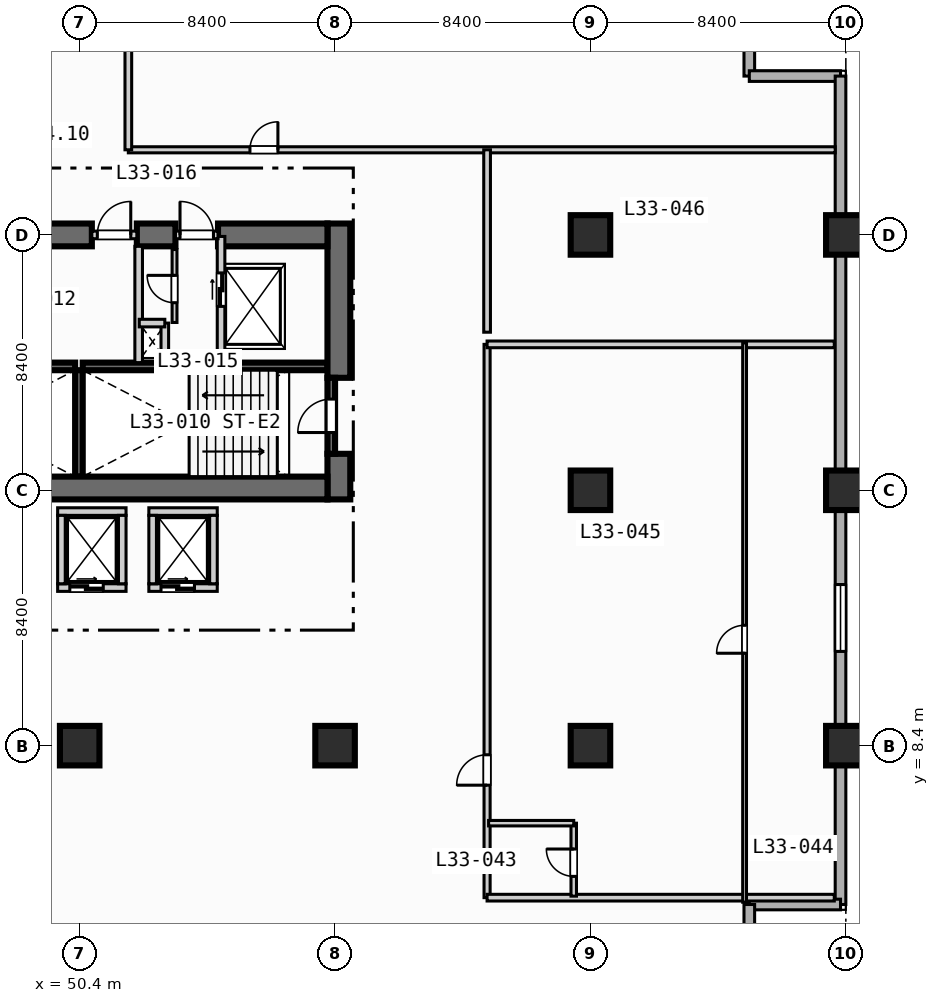
"""IFC4 building model, lengths in metres.
Left out: names, types, materials, properties, quantities, classifications, styles, units other than length and angle.
Written with IfcOpenShell. Run it as: python <this file> out.ifc"""

import sys

from ifc_helpers import new_model, si_unit, direction, frame, frame_2d, origin, origin_2d, place, context, subcontext, project, spatial, rectangle, extrude, element, fill, save


model = new_model("IFC4")
c1 = context("Model", 3, precision=1e-05, world=origin(), true_north=direction((0.0, 1.0)))
c2 = subcontext(c1, "Body", "Model", "MODEL_VIEW")
j1 = project(units=[si_unit("LENGTHUNIT", "METRE"), si_unit("PLANEANGLEUNIT", "RADIAN")], contexts=[c1])
p1 = place(None, origin())
s1 = spatial("IfcSite", under=j1, at=p1, CompositionType="ELEMENT")
p2 = place(p1, origin())
s2 = spatial("IfcBuilding", under=s1, at=p2, CompositionType="ELEMENT")
p3 = place(p2, frame((0.0, 0.0, 138.0)))
s3 = spatial("IfcBuildingStorey", under=s2, at=p3, CompositionType="ELEMENT", Elevation=138.0)
for number, where, z_axis, x_axis in (
    (1, (42.2, 20.875, 0.0), (0.0, 0.0, 1.0), (1.0, 0.0, 0.0)),
    (2, (50.5, 20.875, 0.0), (0.0, 0.0, 1.0), (1.0, 0.0, 0.0)),
):
    element("IfcWall", number, at=place(p3, frame(where, z_axis=z_axis, x_axis=x_axis)), inside=s3, PredefinedType="SOLIDWALL", context=c2, shape_type="SweptSolid", body=[
        extrude(rectangle(XDim=8.05, YDim=0.25, at=frame_2d((4.025, 0.0))), origin(), (0.0, 0.0, 1.0), 3.55),
    ])
p4 = place(p3, frame((50.375, 17.25, 0.0), z_axis=(0.0, 0.0, 1.0), x_axis=(0.0, 1.0, 0.0)))
e3 = element("IfcWall", 3, at=p4, inside=s3, PredefinedType="SOLIDWALL", context=c2, shape_type="SweptSolid", body=[
    extrude(rectangle(XDim=3.5, YDim=0.25, at=frame_2d((1.75, 0.0))), origin(), (0.0, 0.0, 1.0), 3.55),
])
p5 = place(p3, frame((58.925, 16.5, 0.0), z_axis=(0.0, 0.0, 1.0), x_axis=(0.0, 1.0, 0.0)))
e4 = element("IfcWall", 4, at=p5, inside=s3, PredefinedType="SHEAR", context=c2, shape_type="SweptSolid", body=[
    extrude(rectangle(XDim=1.5, YDim=0.75, at=frame_2d((0.75, 0.0))), origin(), (0.0, 0.0, 1.0), 3.55),
])
p6 = place(p3, frame((58.925, 20.5, 0.0), z_axis=(0.0, 0.0, 1.0), x_axis=(0.0, 1.0, 0.0)))
e5 = element("IfcWall", 5, at=p6, inside=s3, PredefinedType="SHEAR", context=c2, shape_type="SweptSolid", body=[
    extrude(rectangle(XDim=5.075, YDim=0.75, at=frame_2d((2.538, 0.0))), origin(), (0.0, 0.0, 1.0), 3.55),
])
p7 = place(p3, frame((42.2, 16.875, 0.0), z_axis=(0.0, 0.0, 1.0), x_axis=(1.0, 0.0, 0.0)))
e6 = element("IfcWall", 6, at=p7, inside=s3, PredefinedType="SHEAR", context=c2, shape_type="SweptSolid", body=[
    extrude(rectangle(XDim=16.35, YDim=0.75, at=frame_2d((8.175, 0.0))), origin(), (0.0, 0.0, 1.0), 3.55),
])
p8 = place(p3, frame((42.2, 25.2, 0.0), z_axis=(0.0, 0.0, 1.0), x_axis=(1.0, 0.0, 0.0)))
e7 = element("IfcWall", 7, at=p8, inside=s3, PredefinedType="SHEAR", context=c2, shape_type="SweptSolid", body=[
    extrude(rectangle(XDim=8.6, YDim=0.75, at=frame_2d((4.3, 0.0))), origin(), (0.0, 0.0, 1.0), 3.55),
])
p9 = place(p3, frame((52.28, 25.2, 0.0), z_axis=(0.0, 0.0, 1.0), x_axis=(1.0, 0.0, 0.0)))
e8 = element("IfcWall", 8, at=p9, inside=s3, PredefinedType="SHEAR", context=c2, shape_type="SweptSolid", body=[
    extrude(rectangle(XDim=1.27, YDim=0.75, at=frame_2d((0.635, 0.0))), origin(), (0.0, 0.0, 1.0), 3.55),
])
p10 = place(p3, frame((54.95, 25.2, 0.0), z_axis=(0.0, 0.0, 1.0), x_axis=(1.0, 0.0, 0.0)))
e9 = element("IfcWall", 9, at=p10, inside=s3, PredefinedType="SHEAR", context=c2, shape_type="SweptSolid", body=[
    extrude(rectangle(XDim=3.6, YDim=0.75, at=frame_2d((1.8, 0.0))), origin(), (0.0, 0.0, 1.0), 3.55),
])
for number, where, z_axis, x_axis in (
    (10, (50.4, 8.4, 0.0), (0.0, 0.0, 1.0), (1.0, 0.0, 0.0)),
    (11, (58.8, 8.4, 0.0), (0.0, 0.0, 1.0), (1.0, 0.0, 0.0)),
    (12, (67.2, 8.4, 0.0), (0.0, 0.0, 1.0), (1.0, 0.0, 0.0)),
    (13, (67.2, 16.8, 0.0), (0.0, 0.0, 1.0), (1.0, 0.0, 0.0)),
    (14, (67.2, 25.2, 0.0), (0.0, 0.0, 1.0), (1.0, 0.0, 0.0)),
    (15, (75.6, 8.4, 0.0), (0.0, 0.0, 1.0), (1.0, 0.0, 0.0)),
    (16, (75.6, 16.8, 0.0), (0.0, 0.0, 1.0), (1.0, 0.0, 0.0)),
    (17, (75.6, 25.2, 0.0), (0.0, 0.0, 1.0), (1.0, 0.0, 0.0)),
):
    element("IfcColumn", number, at=place(p3, frame(where, z_axis=z_axis, x_axis=x_axis)), inside=s3, PredefinedType="COLUMN", context=c2, shape_type="SweptSolid", body=[
        extrude(rectangle(XDim=1.3, YDim=1.3, at=origin_2d()), origin(), (0.0, 0.0, 1.0), 3.8),
    ])
for number, where, z_axis, x_axis in (
    (18, (72.425, 33.425, 0.0), (0.0, 0.0, 1.0), (0.0, -1.0, 0.0)),
    (19, (72.425, 30.425, 0.0), (0.0, 0.0, 1.0), (1.0, 0.0, 0.0)),
):
    element("IfcWall", number, at=place(p3, frame(where, z_axis=z_axis, x_axis=x_axis)), inside=s3, PredefinedType="STANDARD", context=c2, shape_type="SweptSolid", body=[
        extrude(rectangle(XDim=3.0, YDim=0.35, at=frame_2d((1.5, 0.0))), origin(), (0.0, 0.0, 1.0), 3.55),
    ])
p11 = place(p3, frame((75.425, 30.425, 0.0), z_axis=(0.0, 0.0, 1.0), x_axis=(0.0, -1.0, 0.0)))
e20 = element("IfcWall", 20, at=p11, inside=s3, PredefinedType="STANDARD", context=c2, shape_type="SweptSolid", body=[
    extrude(rectangle(XDim=27.25, YDim=0.35, at=frame_2d((13.625, 0.0))), origin(), (0.0, 0.0, 1.0), 3.55),
])
p12 = place(p11, frame((16.725, 0.0, 0.85)))
e21 = element("IfcOpeningElement", 21, at=p12, cuts=e20, PredefinedType="OPENING", context=c2, shape_type="SweptSolid", body=[
    extrude(rectangle(XDim=2.2, YDim=1.8, at=frame_2d((1.1, 0.9))), frame((0.0, 0.185, 0.0), z_axis=(0.0, -1.0, 0.0), x_axis=(1.0, 0.0, 0.0)), (0.0, 0.0, 1.0), 0.37),
])
for number, where, z_axis, x_axis in (
    (22, (75.425, 3.175, 0.0), (0.0, 0.0, 1.0), (-1.0, 0.0, 0.0)),
    (23, (72.425, 3.175, 0.0), (0.0, 0.0, 1.0), (0.0, -1.0, 0.0)),
):
    element("IfcWall", number, at=place(p3, frame(where, z_axis=z_axis, x_axis=x_axis)), inside=s3, PredefinedType="STANDARD", context=c2, shape_type="SweptSolid", body=[
        extrude(rectangle(XDim=3.0, YDim=0.35, at=frame_2d((1.5, 0.0))), origin(), (0.0, 0.0, 1.0), 3.55),
    ])
p13 = place(p3, frame((58.675, 18.0, 0.0), z_axis=(0.0, 0.0, 1.0), x_axis=(0.0, 1.0, 0.0)))
e24 = element("IfcWall", 24, at=p13, inside=s3, PredefinedType="SOLIDWALL", context=c2, shape_type="SweptSolid", body=[
    extrude(rectangle(XDim=2.5, YDim=0.25, at=frame_2d((1.25, 0.0))), origin(), (0.0, 0.0, 1.0), 3.55),
])
p14 = place(p13, frame((0.7, 0.0, 0.0)))
e25 = element("IfcOpeningElement", 25, at=p14, cuts=e24, PredefinedType="OPENING", context=c2, shape_type="SweptSolid", body=[
    extrude(rectangle(XDim=1.1, YDim=2.15, at=frame_2d((0.55, 1.075))), frame((0.0, 0.135, 0.0), z_axis=(0.0, -1.0, 0.0), x_axis=(1.0, 0.0, 0.0)), (0.0, 0.0, 1.0), 0.27),
])
p15 = place(p3, frame((50.8, 25.2, 0.0), z_axis=(0.0, 0.0, 1.0), x_axis=(1.0, 0.0, 0.0)))
e26 = element("IfcWall", 26, at=p15, inside=s3, PredefinedType="SOLIDWALL", context=c2, shape_type="SweptSolid", body=[
    extrude(rectangle(XDim=1.48, YDim=0.25, at=frame_2d((0.74, 0.0))), origin(), (0.0, 0.0, 1.0), 3.55),
])
p16 = place(p15, frame((0.18, 0.0, 0.0)))
e27 = element("IfcOpeningElement", 27, at=p16, cuts=e26, PredefinedType="OPENING", context=c2, shape_type="SweptSolid", body=[
    extrude(rectangle(XDim=1.1, YDim=2.15, at=frame_2d((0.55, 1.075))), frame((0.0, 0.135, 0.0), z_axis=(0.0, -1.0, 0.0), x_axis=(1.0, 0.0, 0.0)), (0.0, 0.0, 1.0), 0.27),
])
p17 = place(p3, frame((52.34, 21.0, 0.0), z_axis=(0.0, 0.0, 1.0), x_axis=(0.0, 1.0, 0.0)))
e28 = element("IfcWall", 28, at=p17, inside=s3, PredefinedType="SOLIDWALL", context=c2, shape_type="SweptSolid", body=[
    extrude(rectangle(XDim=3.825, YDim=0.25, at=frame_2d((1.913, 0.0))), origin(), (0.0, 0.0, 1.0), 3.55),
])
p18 = place(p3, frame((55.05, 21.0, 0.0), z_axis=(0.0, 0.0, 1.0), x_axis=(0.0, 1.0, 0.0)))
e29 = element("IfcWall", 29, at=p18, inside=s3, PredefinedType="SOLIDWALL", context=c2, shape_type="SweptSolid", body=[
    extrude(rectangle(XDim=4.15, YDim=0.25, at=frame_2d((2.075, 0.0))), origin(), (0.0, 0.0, 1.0), 3.55),
])
p19 = place(p18, frame((1.85, 0.0, 0.0)))
e30 = element("IfcOpeningElement", 30, at=p19, cuts=e29, PredefinedType="OPENING", context=c2, shape_type="SweptSolid", body=[
    extrude(rectangle(XDim=1.1, YDim=2.15, at=frame_2d((0.55, 1.075))), frame((0.0, 0.135, 0.0), z_axis=(0.0, -1.0, 0.0), x_axis=(1.0, 0.0, 0.0)), (0.0, 0.0, 1.0), 0.27),
])
p20 = place(p3, frame((53.55, 25.2, 0.0), z_axis=(0.0, 0.0, 1.0), x_axis=(1.0, 0.0, 0.0)))
e31 = element("IfcWall", 31, at=p20, inside=s3, PredefinedType="SOLIDWALL", context=c2, shape_type="SweptSolid", body=[
    extrude(rectangle(XDim=1.4, YDim=0.25, at=frame_2d((0.7, 0.0))), origin(), (0.0, 0.0, 1.0), 3.55),
])
p21 = place(p20, frame((0.15, 0.0, 0.0)))
e32 = element("IfcOpeningElement", 32, at=p21, cuts=e31, PredefinedType="OPENING", context=c2, shape_type="SweptSolid", body=[
    extrude(rectangle(XDim=1.1, YDim=2.15, at=frame_2d((0.55, 1.075))), frame((0.0, 0.135, 0.0), z_axis=(0.0, -1.0, 0.0), x_axis=(1.0, 0.0, 0.0)), (0.0, 0.0, 1.0), 0.27),
])
p22 = place(p3, frame((53.2, 21.0, 0.0), z_axis=(0.0, 0.0, 1.0), x_axis=(0.0, 1.0, 0.0)))
e33 = element("IfcWall", 33, at=p22, inside=s3, PredefinedType="SOLIDWALL", context=c2, shape_type="SweptSolid", body=[
    extrude(rectangle(XDim=1.3, YDim=0.25, at=frame_2d((0.65, 0.0))), origin(), (0.0, 0.0, 1.0), 3.55),
])
p23 = place(p3, frame((52.36, 22.3, 0.0), z_axis=(0.0, 0.0, 1.0), x_axis=(1.0, 0.0, 0.0)))
e34 = element("IfcWall", 34, at=p23, inside=s3, PredefinedType="SOLIDWALL", context=c2, shape_type="SweptSolid", body=[
    extrude(rectangle(XDim=0.84, YDim=0.25, at=frame_2d((0.42, 0.0))), origin(), (0.0, 0.0, 1.0), 3.55),
])
p24 = place(p3, frame((53.52, 22.32, 0.0), z_axis=(0.0, 0.0, 1.0), x_axis=(0.0, 1.0, 0.0)))
e35 = element("IfcWall", 35, at=p24, inside=s3, PredefinedType="PARTITIONING", context=c2, shape_type="SweptSolid", body=[
    extrude(rectangle(XDim=2.4, YDim=0.16, at=frame_2d((1.2, 0.0))), origin(), (0.0, 0.0, 1.0), 3.55),
])
p25 = place(p24, frame((0.65, 0.0, 0.0)))
e36 = element("IfcOpeningElement", 36, at=p25, cuts=e35, PredefinedType="OPENING", context=c2, shape_type="SweptSolid", body=[
    extrude(rectangle(XDim=0.9, YDim=2.1, at=frame_2d((0.45, 1.05))), frame((0.0, 0.09, 0.0), z_axis=(0.0, -1.0, 0.0), x_axis=(1.0, 0.0, 0.0)), (0.0, 0.0, 1.0), 0.18),
])
p26 = place(p3, frame((49.675, 13.6, 0.0), z_axis=(0.0, 0.0, 1.0), x_axis=(1.0, 0.0, 0.0)))
e37 = element("IfcWall", 37, at=p26, inside=s3, PredefinedType="SOLIDWALL", context=c2, shape_type="SweptSolid", body=[
    extrude(rectangle(XDim=2.25, YDim=0.25, at=frame_2d((1.125, 0.0))), origin(), (0.0, 0.0, 1.0), 3.55),
])
p27 = place(p26, frame((0.4, 0.0, 0.0)))
e38 = element("IfcOpeningElement", 38, at=p27, cuts=e37, PredefinedType="OPENING", context=c2, shape_type="SweptSolid", body=[
    extrude(rectangle(XDim=1.1, YDim=2.15, at=frame_2d((0.55, 1.075))), frame((0.0, 0.135, 0.0), z_axis=(0.0, -1.0, 0.0), x_axis=(1.0, 0.0, 0.0)), (0.0, 0.0, 1.0), 0.27),
])
for number, where, z_axis, x_axis in (
    (39, (49.675, 16.1, 0.0), (0.0, 0.0, 1.0), (1.0, 0.0, 0.0)),
    (40, (49.8, 13.725, 0.0), (0.0, 0.0, 1.0), (0.0, 1.0, 0.0)),
    (41, (51.8, 13.725, 0.0), (0.0, 0.0, 1.0), (0.0, 1.0, 0.0)),
):
    element("IfcWall", number, at=place(p3, frame(where, z_axis=z_axis, x_axis=x_axis)), inside=s3, PredefinedType="SOLIDWALL", context=c2, shape_type="SweptSolid", body=[
        extrude(rectangle(XDim=2.25, YDim=0.25, at=frame_2d((1.125, 0.0))), origin(), (0.0, 0.0, 1.0), 3.55),
    ])
p28 = place(p3, frame((52.675, 13.6, 0.0), z_axis=(0.0, 0.0, 1.0), x_axis=(1.0, 0.0, 0.0)))
e42 = element("IfcWall", 42, at=p28, inside=s3, PredefinedType="SOLIDWALL", context=c2, shape_type="SweptSolid", body=[
    extrude(rectangle(XDim=2.25, YDim=0.25, at=frame_2d((1.125, 0.0))), origin(), (0.0, 0.0, 1.0), 3.55),
])
p29 = place(p28, frame((0.4, 0.0, 0.0)))
e43 = element("IfcOpeningElement", 43, at=p29, cuts=e42, PredefinedType="OPENING", context=c2, shape_type="SweptSolid", body=[
    extrude(rectangle(XDim=1.1, YDim=2.15, at=frame_2d((0.55, 1.075))), frame((0.0, 0.135, 0.0), z_axis=(0.0, -1.0, 0.0), x_axis=(1.0, 0.0, 0.0)), (0.0, 0.0, 1.0), 0.27),
])
for number, where, z_axis, x_axis in (
    (44, (52.675, 16.1, 0.0), (0.0, 0.0, 1.0), (1.0, 0.0, 0.0)),
    (45, (52.8, 13.725, 0.0), (0.0, 0.0, 1.0), (0.0, 1.0, 0.0)),
    (46, (54.8, 13.725, 0.0), (0.0, 0.0, 1.0), (0.0, 1.0, 0.0)),
):
    element("IfcWall", number, at=place(p3, frame(where, z_axis=z_axis, x_axis=x_axis)), inside=s3, PredefinedType="SOLIDWALL", context=c2, shape_type="SweptSolid", body=[
        extrude(rectangle(XDim=2.25, YDim=0.25, at=frame_2d((1.125, 0.0))), origin(), (0.0, 0.0, 1.0), 3.55),
    ])
p30 = place(p3, frame((63.8, 3.4, 0.0), z_axis=(0.0, 0.0, 1.0), x_axis=(0.0, 1.0, 0.0)))
e47 = element("IfcWall", 47, at=p30, inside=s3, PredefinedType="PARTITIONING", context=c2, shape_type="SweptSolid", body=[
    extrude(rectangle(XDim=18.2, YDim=0.2, at=frame_2d((9.1, 0.0))), origin(), (0.0, 0.0, 1.0), 3.55),
])
p31 = place(p30, frame((3.7, 0.0, 0.0)))
e48 = element("IfcOpeningElement", 48, at=p31, cuts=e47, PredefinedType="OPENING", context=c2, shape_type="SweptSolid", body=[
    extrude(rectangle(XDim=1.0, YDim=2.15, at=frame_2d((0.5, 1.075))), frame((0.0, 0.11, 0.0), z_axis=(0.0, -1.0, 0.0), x_axis=(1.0, 0.0, 0.0)), (0.0, 0.0, 1.0), 0.22),
])
for number, where, z_axis, x_axis in (
    (49, (63.8, 3.4, 0.0), (0.0, 0.0, 1.0), (1.0, 0.0, 0.0)),
    (50, (63.8, 21.6, 0.0), (0.0, 0.0, 1.0), (1.0, 0.0, 0.0)),
):
    element("IfcWall", number, at=place(p3, frame(where, z_axis=z_axis, x_axis=x_axis)), inside=s3, PredefinedType="PARTITIONING", context=c2, shape_type="SweptSolid", body=[
        extrude(rectangle(XDim=11.42, YDim=0.22, at=frame_2d((5.71, 0.0))), origin(), (0.0, 0.0, 1.0), 3.55),
    ])
p32 = place(p3, frame((66.65, 3.45, 0.0), z_axis=(0.0, 0.0, 1.0), x_axis=(0.0, 1.0, 0.0)))
e51 = element("IfcWall", 51, at=p32, inside=s3, PredefinedType="PLUMBINGWALL", context=c2, shape_type="SweptSolid", body=[
    extrude(rectangle(XDim=2.4, YDim=0.18, at=frame_2d((1.2, 0.0))), origin(), (0.0, 0.0, 1.0), 3.55),
])
p33 = place(p32, frame((0.65, 0.0, 0.0)))
e52 = element("IfcOpeningElement", 52, at=p33, cuts=e51, PredefinedType="OPENING", context=c2, shape_type="SweptSolid", body=[
    extrude(rectangle(XDim=0.9, YDim=2.1, at=frame_2d((0.45, 1.05))), frame((0.0, 0.1, 0.0), z_axis=(0.0, -1.0, 0.0), x_axis=(1.0, 0.0, 0.0)), (0.0, 0.0, 1.0), 0.2),
])
p34 = place(p3, frame((63.85, 5.85, 0.0), z_axis=(0.0, 0.0, 1.0), x_axis=(1.0, 0.0, 0.0)))
e53 = element("IfcWall", 53, at=p34, inside=s3, PredefinedType="PLUMBINGWALL", context=c2, shape_type="SweptSolid", body=[
    extrude(rectangle(XDim=2.8, YDim=0.18, at=frame_2d((1.4, 0.0))), origin(), (0.0, 0.0, 1.0), 3.55),
])
p35 = place(p3, frame((72.27, 3.25, 0.0), z_axis=(0.0, 0.0, 1.0), x_axis=(0.0, 1.0, 0.0)))
e54 = element("IfcWall", 54, at=p35, inside=s3, PredefinedType="PARTITIONING", context=c2, shape_type="SweptSolid", body=[
    extrude(rectangle(XDim=18.4, YDim=0.125, at=frame_2d((9.2, 0.0))), origin(), (0.0, 0.0, 1.0), 3.55),
])
p36 = place(p35, frame((8.19, 0.0, 0.0)))
e55 = element("IfcOpeningElement", 55, at=p36, cuts=e54, PredefinedType="OPENING", context=c2, shape_type="SweptSolid", body=[
    extrude(rectangle(XDim=0.92, YDim=2.1, at=frame_2d((0.46, 1.05))), frame((0.0, 0.073, 0.0), z_axis=(0.0, -1.0, 0.0), x_axis=(1.0, 0.0, 0.0)), (0.0, 0.0, 1.0), 0.145),
])
p37 = place(p3, frame((52.0, 28.0, 0.0), z_axis=(0.0, 0.0, 1.0), x_axis=(1.0, 0.0, 0.0)))
e56 = element("IfcWall", 56, at=p37, inside=s3, PredefinedType="PARTITIONING", context=c2, shape_type="SweptSolid", body=[
    extrude(rectangle(XDim=23.25, YDim=0.2, at=frame_2d((11.625, 0.0))), origin(), (0.0, 0.0, 1.0), 3.55),
])
p38 = place(p37, frame((4.0, 0.0, 0.0)))
e57 = element("IfcOpeningElement", 57, at=p38, cuts=e56, PredefinedType="OPENING", context=c2, shape_type="SweptSolid", body=[
    extrude(rectangle(XDim=0.92, YDim=2.1, at=frame_2d((0.46, 1.05))), frame((0.0, 0.11, 0.0), z_axis=(0.0, -1.0, 0.0), x_axis=(1.0, 0.0, 0.0)), (0.0, 0.0, 1.0), 0.22),
])
p39 = place(p3, frame((52.0, 28.0, 0.0), z_axis=(0.0, 0.0, 1.0), x_axis=(0.0, 1.0, 0.0)))
e58 = element("IfcWall", 58, at=p39, inside=s3, PredefinedType="PARTITIONING", context=c2, shape_type="SweptSolid", body=[
    extrude(rectangle(XDim=5.3, YDim=0.22, at=frame_2d((2.65, 0.0))), origin(), (0.0, 0.0, 1.0), 3.55),
])
p40 = place(p3, frame((63.8, 22.0, 0.0), z_axis=(0.0, 0.0, 1.0), x_axis=(0.0, 1.0, 0.0)))
e59 = element("IfcWall", 59, at=p40, inside=s3, PredefinedType="PARTITIONING", context=c2, shape_type="SweptSolid", body=[
    extrude(rectangle(XDim=6.0, YDim=0.22, at=frame_2d((3.0, 0.0))), origin(), (0.0, 0.0, 1.0), 3.55),
])
p41 = place(p12, origin())
e60 = element("IfcWindow", 60, at=p41, inside=s3, PartitioningType="SINGLE_PANEL", PredefinedType="WINDOW", context=c2, shape_type="SweptSolid", body=[
    extrude(rectangle(XDim=2.2, YDim=1.8, at=frame_2d((1.1, 0.9))), frame((0.0, 0.03, 0.0), z_axis=(0.0, -1.0, 0.0), x_axis=(1.0, 0.0, 0.0)), (0.0, 0.0, 1.0), 0.06),
])
fill(e21, e60)
p42 = place(p14, origin())
e61 = element("IfcDoor", 61, at=p42, inside=s3, OperationType="SINGLE_SWING_LEFT", PredefinedType="DOOR", context=c2, shape_type="SweptSolid", body=[
    extrude(rectangle(XDim=1.1, YDim=2.15, at=frame_2d((0.55, 1.075))), frame((0.0, 0.025, 0.0), z_axis=(0.0, -1.0, 0.0), x_axis=(1.0, 0.0, 0.0)), (0.0, 0.0, 1.0), 0.05),
])
fill(e25, e61)
p43 = place(p16, origin())
e62 = element("IfcDoor", 62, at=p43, inside=s3, OperationType="SINGLE_SWING_RIGHT", PredefinedType="DOOR", context=c2, shape_type="SweptSolid", body=[
    extrude(rectangle(XDim=1.1, YDim=2.15, at=frame_2d((0.55, 1.075))), frame((0.0, 0.025, 0.0), z_axis=(0.0, -1.0, 0.0), x_axis=(1.0, 0.0, 0.0)), (0.0, 0.0, 1.0), 0.05),
])
fill(e27, e62)
p44 = place(p19, origin())
e63 = element("IfcDoor", 63, at=p44, inside=s3, OperationType="SLIDING_TO_LEFT", PredefinedType="DOOR", context=c2, shape_type="SweptSolid", body=[
    extrude(rectangle(XDim=1.1, YDim=2.15, at=frame_2d((0.55, 1.075))), frame((0.0, 0.025, 0.0), z_axis=(0.0, -1.0, 0.0), x_axis=(1.0, 0.0, 0.0)), (0.0, 0.0, 1.0), 0.05),
])
fill(e30, e63)
p45 = place(p21, origin())
e64 = element("IfcDoor", 64, at=p45, inside=s3, OperationType="SINGLE_SWING_LEFT", PredefinedType="DOOR", context=c2, shape_type="SweptSolid", body=[
    extrude(rectangle(XDim=1.1, YDim=2.15, at=frame_2d((0.55, 1.075))), frame((0.0, 0.025, 0.0), z_axis=(0.0, -1.0, 0.0), x_axis=(1.0, 0.0, 0.0)), (0.0, 0.0, 1.0), 0.05),
])
fill(e32, e64)
p46 = place(p25, origin())
e65 = element("IfcDoor", 65, at=p46, inside=s3, OperationType="SINGLE_SWING_RIGHT", PredefinedType="DOOR", context=c2, shape_type="SweptSolid", body=[
    extrude(rectangle(XDim=0.9, YDim=2.1, at=frame_2d((0.45, 1.05))), frame((0.0, 0.025, 0.0), z_axis=(0.0, -1.0, 0.0), x_axis=(1.0, 0.0, 0.0)), (0.0, 0.0, 1.0), 0.05),
])
fill(e36, e65)
p47 = place(p27, origin())
e66 = element("IfcDoor", 66, at=p47, inside=s3, OperationType="SLIDING_TO_LEFT", PredefinedType="DOOR", context=c2, shape_type="SweptSolid", body=[
    extrude(rectangle(XDim=1.1, YDim=2.15, at=frame_2d((0.55, 1.075))), frame((0.0, 0.025, 0.0), z_axis=(0.0, -1.0, 0.0), x_axis=(1.0, 0.0, 0.0)), (0.0, 0.0, 1.0), 0.05),
])
fill(e38, e66)
p48 = place(p29, origin())
e67 = element("IfcDoor", 67, at=p48, inside=s3, OperationType="SLIDING_TO_LEFT", PredefinedType="DOOR", context=c2, shape_type="SweptSolid", body=[
    extrude(rectangle(XDim=1.1, YDim=2.15, at=frame_2d((0.55, 1.075))), frame((0.0, 0.025, 0.0), z_axis=(0.0, -1.0, 0.0), x_axis=(1.0, 0.0, 0.0)), (0.0, 0.0, 1.0), 0.05),
])
fill(e43, e67)
p49 = place(p31, origin())
e68 = element("IfcDoor", 68, at=p49, inside=s3, OperationType="SINGLE_SWING_LEFT", PredefinedType="DOOR", context=c2, shape_type="SweptSolid", body=[
    extrude(rectangle(XDim=1.0, YDim=2.15, at=frame_2d((0.5, 1.075))), frame((0.0, 0.025, 0.0), z_axis=(0.0, -1.0, 0.0), x_axis=(1.0, 0.0, 0.0)), (0.0, 0.0, 1.0), 0.05),
])
fill(e48, e68)
p50 = place(p33, origin())
e69 = element("IfcDoor", 69, at=p50, inside=s3, OperationType="SINGLE_SWING_RIGHT", PredefinedType="DOOR", context=c2, shape_type="SweptSolid", body=[
    extrude(rectangle(XDim=0.9, YDim=2.1, at=frame_2d((0.45, 1.05))), frame((0.0, 0.025, 0.0), z_axis=(0.0, -1.0, 0.0), x_axis=(1.0, 0.0, 0.0)), (0.0, 0.0, 1.0), 0.05),
])
fill(e52, e69)
p51 = place(p36, origin())
e70 = element("IfcDoor", 70, at=p51, inside=s3, OperationType="SINGLE_SWING_LEFT", PredefinedType="DOOR", context=c2, shape_type="SweptSolid", body=[
    extrude(rectangle(XDim=0.92, YDim=2.1, at=frame_2d((0.46, 1.05))), frame((0.0, 0.025, 0.0), z_axis=(0.0, -1.0, 0.0), x_axis=(1.0, 0.0, 0.0)), (0.0, 0.0, 1.0), 0.05),
])
fill(e55, e70)
p52 = place(p38, origin())
e71 = element("IfcDoor", 71, at=p52, inside=s3, OperationType="SINGLE_SWING_RIGHT", PredefinedType="DOOR", context=c2, shape_type="SweptSolid", body=[
    extrude(rectangle(XDim=0.92, YDim=2.1, at=frame_2d((0.46, 1.05))), frame((0.0, 0.025, 0.0), z_axis=(0.0, -1.0, 0.0), x_axis=(1.0, 0.0, 0.0)), (0.0, 0.0, 1.0), 0.05),
])
fill(e57, e71)
save(model, sys.argv[1])
